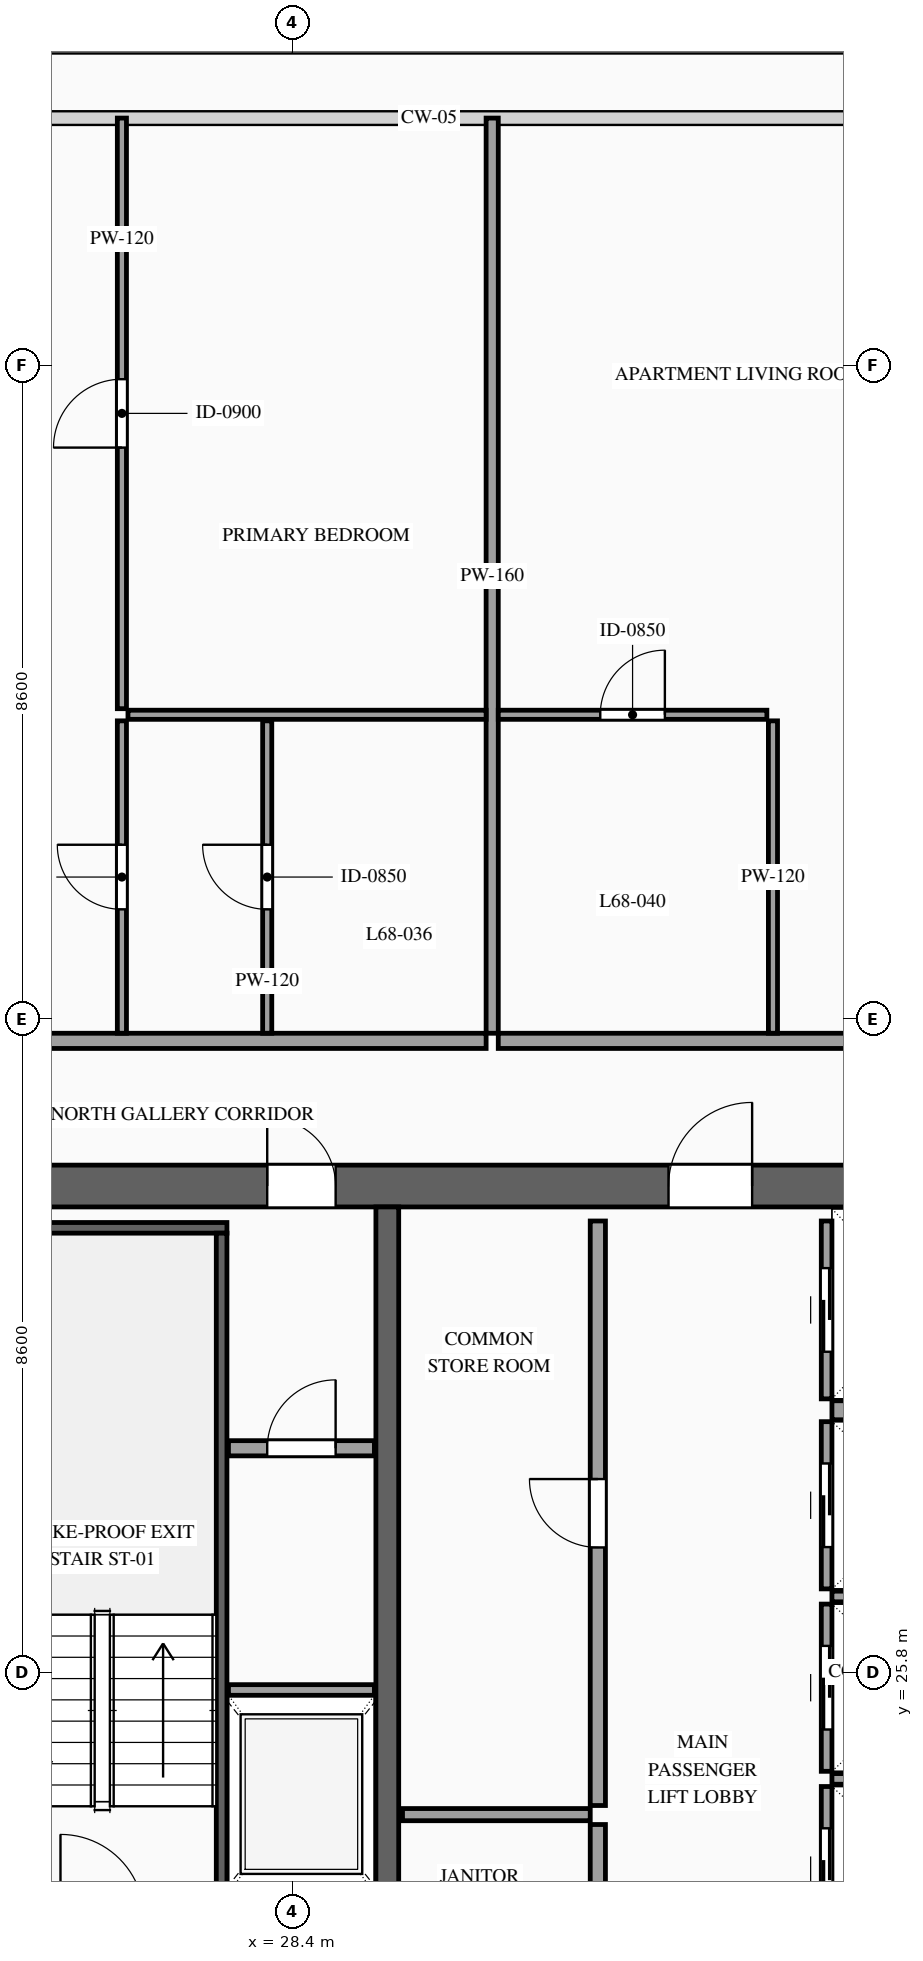
"""IFC4 building model, lengths in metres.
Left out: names, types, materials, properties, quantities, classifications, styles, units other than length and angle.
Written with IfcOpenShell. Run it as: python <this file> out.ifc"""

import sys

from ifc_helpers import new_model, si_unit, direction, frame, frame_2d, origin, place, context, subcontext, project, spatial, rectangle, extrude, source, transform, mapped, element, fill, save


model = new_model("IFC4")
c1 = context("Model", 3, precision=1e-05, world=origin(), true_north=direction((0.0, 1.0)))
c2 = subcontext(c1, "Body", "Model", "MODEL_VIEW")
j1 = project(units=[si_unit("LENGTHUNIT", "METRE"), si_unit("PLANEANGLEUNIT", "RADIAN")], contexts=[c1])
p1 = place(None, origin())
s1 = spatial("IfcSite", under=j1, at=p1, CompositionType="ELEMENT")
p2 = place(p1, origin())
s2 = spatial("IfcBuilding", under=s1, at=p2, CompositionType="ELEMENT")
p3 = place(p2, frame((0.0, 0.0, 255.6)))
s3 = spatial("IfcBuildingStorey", under=s2, at=p3, CompositionType="ELEMENT", Elevation=255.6)
p4 = place(p3, frame((23.525, 32.2, 0.0), z_axis=(0.0, 0.0, 1.0), x_axis=(1.0, 0.0, 0.0)))
e1 = element("IfcWall", 1, at=p4, inside=s3, PredefinedType="SHEAR", context=c2, shape_type="SweptSolid", body=[
    extrude(rectangle(XDim=26.95, YDim=0.55, at=frame_2d((13.475, 0.0))), origin(), (0.0, 0.0, 1.0), 3.5),
])
p5 = place(p4, frame((4.545, 0.0, 0.0)))
e2 = element("IfcOpeningElement", 2, at=p5, cuts=e1, PredefinedType="OPENING", context=c2, shape_type="SweptSolid", body=[
    extrude(rectangle(XDim=0.9, YDim=2.15, at=frame_2d((0.45, 1.075))), frame((0.0, 0.29, 0.0), z_axis=(0.0, -1.0, 0.0), x_axis=(1.0, 0.0, 0.0)), (0.0, 0.0, 1.0), 0.58),
])
p6 = place(p4, frame((9.825, 0.0, 0.0)))
e3 = element("IfcOpeningElement", 3, at=p6, cuts=e1, PredefinedType="OPENING", context=c2, shape_type="SweptSolid", body=[
    extrude(rectangle(XDim=1.1, YDim=2.2, at=frame_2d((0.55, 1.1))), frame((0.0, 0.29, 0.0), z_axis=(0.0, -1.0, 0.0), x_axis=(1.0, 0.0, 0.0)), (0.0, 0.0, 1.0), 0.58),
])
p7 = place(p4, frame((15.675, 0.0, 0.0)))
e4 = element("IfcOpeningElement", 4, at=p7, cuts=e1, PredefinedType="OPENING", context=c2, shape_type="SweptSolid", body=[
    extrude(rectangle(XDim=1.1, YDim=2.2, at=frame_2d((0.55, 1.1))), frame((0.0, 0.29, 0.0), z_axis=(0.0, -1.0, 0.0), x_axis=(1.0, 0.0, 0.0)), (0.0, 0.0, 1.0), 0.58),
])
p8 = place(p4, frame((18.875, 0.0, 0.0)))
e5 = element("IfcOpeningElement", 5, at=p8, cuts=e1, PredefinedType="OPENING", context=c2, shape_type="SweptSolid", body=[
    extrude(rectangle(XDim=0.9, YDim=2.15, at=frame_2d((0.45, 1.075))), frame((0.0, 0.29, 0.0), z_axis=(0.0, -1.0, 0.0), x_axis=(1.0, 0.0, 0.0)), (0.0, 0.0, 1.0), 0.58),
])
m1 = source(origin(), c2, "Body", "SweptSolid", [
    extrude(rectangle(XDim=12.25, YDim=0.3, at=frame_2d((6.125, 0.0))), origin(), (0.0, 0.0, 1.0), 3.5),
])
p9 = place(p3, frame((29.65, 19.675, 0.0), z_axis=(0.0, 0.0, 1.0), x_axis=(0.0, 1.0, 0.0)))
e6 = element("IfcWall", 6, at=p9, inside=s3, PredefinedType="SOLIDWALL", context=c2, shape_type="MappedRepresentation", body=[
    mapped(m1, transform((0.0, 0.0, 0.0), scale=1.0)),
])
m2 = source(origin(), c2, "Body", "SweptSolid", [
    extrude(rectangle(XDim=1.92, YDim=0.14, at=frame_2d((0.96, 0.0))), origin(), (0.0, 0.0, 1.0), 3.2),
])
p10 = place(p3, frame((27.56, 25.57, 0.0), z_axis=(0.0, 0.0, 1.0), x_axis=(1.0, 0.0, 0.0)))
e7 = element("IfcWall", 7, at=p10, inside=s3, PredefinedType="SOLIDWALL", context=c2, shape_type="MappedRepresentation", body=[
    mapped(m2, transform((0.0, 0.0, 0.0), scale=1.0)),
])
p11 = place(p3, frame((35.43, 22.1, 0.0), z_axis=(0.0, 0.0, 1.0), x_axis=(0.0, 1.0, 0.0)))
e8 = element("IfcWall", 8, at=p11, inside=s3, PredefinedType="SOLIDWALL", context=c2, shape_type="SweptSolid", body=[
    extrude(rectangle(XDim=2.2, YDim=0.14, at=frame_2d((1.1, 0.0))), origin(), (0.0, 0.0, 1.0), 3.2),
])
p12 = place(p11, frame((0.55, 0.0, 0.0)))
e9 = element("IfcOpeningElement", 9, at=p12, cuts=e8, PredefinedType="OPENING", context=c2, shape_type="SweptSolid", body=[
    extrude(rectangle(XDim=1.1, YDim=2.2, at=frame_2d((0.55, 1.1))), frame((0.0, 0.085, 0.0), z_axis=(0.0, -1.0, 0.0), x_axis=(1.0, 0.0, 0.0)), (0.0, 0.0, 1.0), 0.17),
])
m3 = source(origin(), c2, "Body", "SweptSolid", [
    extrude(rectangle(XDim=2.4, YDim=0.14, at=frame_2d((1.2, 0.0))), origin(), (0.0, 0.0, 1.0), 3.2),
])
p13 = place(p3, frame((35.5, 24.4, 0.0), z_axis=(0.0, 0.0, 1.0), x_axis=(1.0, 0.0, 0.0)))
e10 = element("IfcWall", 10, at=p13, inside=s3, PredefinedType="SOLIDWALL", context=c2, shape_type="MappedRepresentation", body=[
    mapped(m3, transform((0.0, 0.0, 0.0), scale=1.0)),
])
p14 = place(p3, frame((35.43, 24.5, 0.0), z_axis=(0.0, 0.0, 1.0), x_axis=(0.0, 1.0, 0.0)))
e11 = element("IfcWall", 11, at=p14, inside=s3, PredefinedType="SOLIDWALL", context=c2, shape_type="SweptSolid", body=[
    extrude(rectangle(XDim=2.2, YDim=0.14, at=frame_2d((1.1, 0.0))), origin(), (0.0, 0.0, 1.0), 3.2),
])
p15 = place(p14, frame((0.55, 0.0, 0.0)))
e12 = element("IfcOpeningElement", 12, at=p15, cuts=e11, PredefinedType="OPENING", context=c2, shape_type="SweptSolid", body=[
    extrude(rectangle(XDim=1.1, YDim=2.2, at=frame_2d((0.55, 1.1))), frame((0.0, 0.085, 0.0), z_axis=(0.0, -1.0, 0.0), x_axis=(1.0, 0.0, 0.0)), (0.0, 0.0, 1.0), 0.17),
])
p16 = place(p3, frame((35.5, 26.8, 0.0), z_axis=(0.0, 0.0, 1.0), x_axis=(1.0, 0.0, 0.0)))
e13 = element("IfcWall", 13, at=p16, inside=s3, PredefinedType="SOLIDWALL", context=c2, shape_type="MappedRepresentation", body=[
    mapped(m3, transform((0.0, 0.0, 0.0), scale=1.0)),
])
p17 = place(p3, frame((35.43, 26.9, 0.0), z_axis=(0.0, 0.0, 1.0), x_axis=(0.0, 1.0, 0.0)))
e14 = element("IfcWall", 14, at=p17, inside=s3, PredefinedType="SOLIDWALL", context=c2, shape_type="SweptSolid", body=[
    extrude(rectangle(XDim=2.2, YDim=0.14, at=frame_2d((1.1, 0.0))), origin(), (0.0, 0.0, 1.0), 3.2),
])
p18 = place(p17, frame((0.55, 0.0, 0.0)))
e15 = element("IfcOpeningElement", 15, at=p18, cuts=e14, PredefinedType="OPENING", context=c2, shape_type="SweptSolid", body=[
    extrude(rectangle(XDim=1.1, YDim=2.2, at=frame_2d((0.55, 1.1))), frame((0.0, 0.085, 0.0), z_axis=(0.0, -1.0, 0.0), x_axis=(1.0, 0.0, 0.0)), (0.0, 0.0, 1.0), 0.17),
])
p19 = place(p3, frame((35.43, 29.4, 0.0), z_axis=(0.0, 0.0, 1.0), x_axis=(0.0, 1.0, 0.0)))
e16 = element("IfcWall", 16, at=p19, inside=s3, PredefinedType="SOLIDWALL", context=c2, shape_type="SweptSolid", body=[
    extrude(rectangle(XDim=2.34, YDim=0.14, at=frame_2d((1.17, 0.0))), origin(), (0.0, 0.0, 1.0), 3.2),
])
p20 = place(p19, frame((0.62, 0.0, 0.0)))
e17 = element("IfcOpeningElement", 17, at=p20, cuts=e16, PredefinedType="OPENING", context=c2, shape_type="SweptSolid", body=[
    extrude(rectangle(XDim=1.1, YDim=2.2, at=frame_2d((0.55, 1.1))), frame((0.0, 0.085, 0.0), z_axis=(0.0, -1.0, 0.0), x_axis=(1.0, 0.0, 0.0)), (0.0, 0.0, 1.0), 0.17),
])
m4 = source(origin(), c2, "Body", "SweptSolid", [
    extrude(rectangle(XDim=2.4, YDim=0.25, at=frame_2d((1.2, 0.0))), origin(), (0.0, 0.0, 1.0), 3.2),
])
p21 = place(p3, frame((35.5, 29.25, 0.0), z_axis=(0.0, 0.0, 1.0), x_axis=(1.0, 0.0, 0.0)))
e18 = element("IfcWall", 18, at=p21, inside=s3, PredefinedType="SOLIDWALL", context=c2, shape_type="MappedRepresentation", body=[
    mapped(m4, transform((0.0, 0.0, 0.0), scale=1.0)),
])
m5 = source(origin(), c2, "Body", "SweptSolid", [
    extrude(rectangle(XDim=3.28, YDim=0.14, at=frame_2d((1.64, 0.0))), origin(), (0.0, 0.0, 1.0), 3.2),
])
p22 = place(p3, frame((24.26, 31.65, 0.0), z_axis=(0.0, 0.0, 1.0), x_axis=(1.0, 0.0, 0.0)))
e19 = element("IfcWall", 19, at=p22, inside=s3, PredefinedType="SOLIDWALL", context=c2, shape_type="MappedRepresentation", body=[
    mapped(m5, transform((0.0, 0.0, 0.0), scale=1.0)),
])
m6 = source(origin(), c2, "Body", "SweptSolid", [
    extrude(rectangle(XDim=8.94, YDim=0.14, at=frame_2d((4.47, 0.0))), origin(), (0.0, 0.0, 1.0), 3.2),
])
p23 = place(p3, frame((27.47, 22.64, 0.0), z_axis=(0.0, 0.0, 1.0), x_axis=(0.0, 1.0, 0.0)))
e20 = element("IfcWall", 20, at=p23, inside=s3, PredefinedType="SOLIDWALL", context=c2, shape_type="MappedRepresentation", body=[
    mapped(m6, transform((0.0, 0.0, 0.0), scale=1.0)),
])
p24 = place(p3, frame((27.56, 28.75, 0.0), z_axis=(0.0, 0.0, 1.0), x_axis=(1.0, 0.0, 0.0)))
e21 = element("IfcWall", 21, at=p24, inside=s3, PredefinedType="PARTITIONING", context=c2, shape_type="SweptSolid", body=[
    extrude(rectangle(XDim=1.92, YDim=0.2, at=frame_2d((0.96, 0.0))), origin(), (0.0, 0.0, 1.0), 3.2),
])
p25 = place(p24, frame((0.51, 0.0, 0.0)))
e22 = element("IfcOpeningElement", 22, at=p25, cuts=e21, PredefinedType="OPENING", context=c2, shape_type="SweptSolid", body=[
    extrude(rectangle(XDim=0.9, YDim=2.15, at=frame_2d((0.45, 1.075))), frame((0.0, 0.115, 0.0), z_axis=(0.0, -1.0, 0.0), x_axis=(1.0, 0.0, 0.0)), (0.0, 0.0, 1.0), 0.23),
])
p26 = place(p3, frame((32.42, 19.86, 0.0), z_axis=(0.0, 0.0, 1.0), x_axis=(0.0, 1.0, 0.0)))
e23 = element("IfcWall", 23, at=p26, inside=s3, PredefinedType="PARTITIONING", context=c2, shape_type="SweptSolid", body=[
    extrude(rectangle(XDim=3.94, YDim=0.2, at=frame_2d((1.97, 0.0))), origin(), (0.0, 0.0, 1.0), 3.2),
])
p27 = place(p26, frame((1.52, 0.0, 0.0)))
e24 = element("IfcOpeningElement", 24, at=p27, cuts=e23, PredefinedType="OPENING", context=c2, shape_type="SweptSolid", body=[
    extrude(rectangle(XDim=0.9, YDim=2.15, at=frame_2d((0.45, 1.075))), frame((0.0, 0.115, 0.0), z_axis=(0.0, -1.0, 0.0), x_axis=(1.0, 0.0, 0.0)), (0.0, 0.0, 1.0), 0.23),
])
p28 = place(p3, frame((32.42, 24.05, 0.0), z_axis=(0.0, 0.0, 1.0), x_axis=(0.0, 1.0, 0.0)))
e25 = element("IfcWall", 25, at=p28, inside=s3, PredefinedType="PARTITIONING", context=c2, shape_type="SweptSolid", body=[
    extrude(rectangle(XDim=7.69, YDim=0.2, at=frame_2d((3.845, 0.0))), origin(), (0.0, 0.0, 1.0), 3.2),
])
p29 = place(p28, frame((3.395, 0.0, 0.0)))
e26 = element("IfcOpeningElement", 26, at=p29, cuts=e25, PredefinedType="OPENING", context=c2, shape_type="SweptSolid", body=[
    extrude(rectangle(XDim=0.9, YDim=2.15, at=frame_2d((0.45, 1.075))), frame((0.0, 0.115, 0.0), z_axis=(0.0, -1.0, 0.0), x_axis=(1.0, 0.0, 0.0)), (0.0, 0.0, 1.0), 0.23),
])
m7 = source(origin(), c2, "Body", "SweptSolid", [
    extrude(rectangle(XDim=2.47, YDim=0.16, at=frame_2d((1.235, 0.0))), origin(), (0.0, 0.0, 1.0), 3.2),
])
p30 = place(p3, frame((29.85, 23.93, 0.0), z_axis=(0.0, 0.0, 1.0), x_axis=(1.0, 0.0, 0.0)))
e27 = element("IfcWall", 27, at=p30, inside=s3, PredefinedType="PARTITIONING", context=c2, shape_type="MappedRepresentation", body=[
    mapped(m7, transform((0.0, 0.0, 0.0), scale=1.0)),
])
p31 = place(p3, frame((19.44, 34.11, 0.0), z_axis=(0.0, 0.0, 1.0), x_axis=(1.0, 0.0, 0.0)))
e28 = element("IfcWall", 28, at=p31, inside=s3, PredefinedType="PARTITIONING", context=c2, shape_type="SweptSolid", body=[
    extrude(rectangle(XDim=11.51, YDim=0.2, at=frame_2d((5.755, 0.0))), origin(), (0.0, 0.0, 1.0), 3.2),
])
p32 = place(p31, frame((4.626, 0.0, 0.0)))
e29 = element("IfcOpeningElement", 29, at=p32, cuts=e28, PredefinedType="OPENING", context=c2, shape_type="SweptSolid", body=[
    extrude(rectangle(XDim=1.0, YDim=2.2, at=frame_2d((0.5, 1.1))), frame((0.0, 0.115, 0.0), z_axis=(0.0, -1.0, 0.0), x_axis=(1.0, 0.0, 0.0)), (0.0, 0.0, 1.0), 0.23),
])
m8 = source(origin(), c2, "Body", "SweptSolid", [
    extrude(rectangle(XDim=12.04, YDim=0.16, at=frame_2d((6.02, 0.0))), origin(), (0.0, 0.0, 1.0), 3.2),
])
p33 = place(p3, frame((31.03, 34.21, 0.0), z_axis=(0.0, 0.0, 1.0), x_axis=(0.0, 1.0, 0.0)))
e30 = element("IfcWall", 30, at=p33, inside=s3, PredefinedType="PARTITIONING", context=c2, shape_type="MappedRepresentation", body=[
    mapped(m8, transform((0.0, 0.0, 0.0), scale=1.0)),
])
p34 = place(p3, frame((28.07, 34.21, 0.0), z_axis=(0.0, 0.0, 1.0), x_axis=(0.0, 1.0, 0.0)))
e31 = element("IfcWall", 31, at=p34, inside=s3, PredefinedType="PARTITIONING", context=c2, shape_type="SweptSolid", body=[
    extrude(rectangle(XDim=4.11, YDim=0.12, at=frame_2d((2.055, 0.0))), origin(), (0.0, 0.0, 1.0), 3.2),
])
p35 = place(p34, frame((1.63, 0.0, 0.0)))
e32 = element("IfcOpeningElement", 32, at=p35, cuts=e31, PredefinedType="OPENING", context=c2, shape_type="SweptSolid", body=[
    extrude(rectangle(XDim=0.85, YDim=2.1, at=frame_2d((0.425, 1.05))), frame((0.0, 0.075, 0.0), z_axis=(0.0, -1.0, 0.0), x_axis=(1.0, 0.0, 0.0)), (0.0, 0.0, 1.0), 0.15),
])
m9 = source(origin(), c2, "Body", "SweptSolid", [
    extrude(rectangle(XDim=4.712, YDim=0.12, at=frame_2d((2.356, 0.0))), origin(), (0.0, 0.0, 1.0), 3.2),
])
p36 = place(p3, frame((26.238, 38.4, 0.0), z_axis=(0.0, 0.0, 1.0), x_axis=(1.0, 0.0, 0.0)))
e33 = element("IfcWall", 33, at=p36, inside=s3, PredefinedType="PARTITIONING", context=c2, shape_type="MappedRepresentation", body=[
    mapped(m9, transform((0.0, 0.0, 0.0), scale=1.0)),
])
p37 = place(p3, frame((26.158, 38.48, 0.0), z_axis=(0.0, 0.0, 1.0), x_axis=(0.0, 1.0, 0.0)))
e34 = element("IfcWall", 34, at=p37, inside=s3, PredefinedType="PARTITIONING", context=c2, shape_type="SweptSolid", body=[
    extrude(rectangle(XDim=7.77, YDim=0.12, at=frame_2d((3.885, 0.0))), origin(), (0.0, 0.0, 1.0), 3.2),
])
p38 = place(p37, frame((3.435, 0.0, 0.0)))
e35 = element("IfcOpeningElement", 35, at=p38, cuts=e34, PredefinedType="OPENING", context=c2, shape_type="SweptSolid", body=[
    extrude(rectangle(XDim=0.9, YDim=2.15, at=frame_2d((0.45, 1.075))), frame((0.0, 0.075, 0.0), z_axis=(0.0, -1.0, 0.0), x_axis=(1.0, 0.0, 0.0)), (0.0, 0.0, 1.0), 0.15),
])
p39 = place(p3, frame((26.158, 34.21, 0.0), z_axis=(0.0, 0.0, 1.0), x_axis=(0.0, 1.0, 0.0)))
e36 = element("IfcWall", 36, at=p39, inside=s3, PredefinedType="PARTITIONING", context=c2, shape_type="SweptSolid", body=[
    extrude(rectangle(XDim=4.11, YDim=0.12, at=frame_2d((2.055, 0.0))), origin(), (0.0, 0.0, 1.0), 3.2),
])
p40 = place(p39, frame((1.63, 0.0, 0.0)))
e37 = element("IfcOpeningElement", 37, at=p40, cuts=e36, PredefinedType="OPENING", context=c2, shape_type="SweptSolid", body=[
    extrude(rectangle(XDim=0.85, YDim=2.1, at=frame_2d((0.425, 1.05))), frame((0.0, 0.075, 0.0), z_axis=(0.0, -1.0, 0.0), x_axis=(1.0, 0.0, 0.0)), (0.0, 0.0, 1.0), 0.15),
])
p41 = place(p3, frame((31.11, 34.11, 0.0), z_axis=(0.0, 0.0, 1.0), x_axis=(1.0, 0.0, 0.0)))
e38 = element("IfcWall", 38, at=p41, inside=s3, PredefinedType="PARTITIONING", context=c2, shape_type="SweptSolid", body=[
    extrude(rectangle(XDim=11.78, YDim=0.2, at=frame_2d((5.89, 0.0))), origin(), (0.0, 0.0, 1.0), 3.2),
])
p42 = place(p41, frame((4.801, 0.0, 0.0)))
e39 = element("IfcOpeningElement", 39, at=p42, cuts=e38, PredefinedType="OPENING", context=c2, shape_type="SweptSolid", body=[
    extrude(rectangle(XDim=1.0, YDim=2.2, at=frame_2d((0.5, 1.1))), frame((0.0, 0.115, 0.0), z_axis=(0.0, -1.0, 0.0), x_axis=(1.0, 0.0, 0.0)), (0.0, 0.0, 1.0), 0.23),
])
p43 = place(p3, frame((31.11, 38.4, 0.0), z_axis=(0.0, 0.0, 1.0), x_axis=(1.0, 0.0, 0.0)))
e40 = element("IfcWall", 40, at=p43, inside=s3, PredefinedType="PARTITIONING", context=c2, shape_type="SweptSolid", body=[
    extrude(rectangle(XDim=3.534, YDim=0.12, at=frame_2d((1.767, 0.0))), origin(), (0.0, 0.0, 1.0), 3.2),
])
p44 = place(p43, frame((1.342, 0.0, 0.0)))
e41 = element("IfcOpeningElement", 41, at=p44, cuts=e40, PredefinedType="OPENING", context=c2, shape_type="SweptSolid", body=[
    extrude(rectangle(XDim=0.85, YDim=2.1, at=frame_2d((0.425, 1.05))), frame((0.0, 0.075, 0.0), z_axis=(0.0, -1.0, 0.0), x_axis=(1.0, 0.0, 0.0)), (0.0, 0.0, 1.0), 0.15),
])
m10 = source(origin(), c2, "Body", "SweptSolid", [
    extrude(rectangle(XDim=4.11, YDim=0.12, at=frame_2d((2.055, 0.0))), origin(), (0.0, 0.0, 1.0), 3.2),
])
p45 = place(p3, frame((34.724, 34.21, 0.0), z_axis=(0.0, 0.0, 1.0), x_axis=(0.0, 1.0, 0.0)))
e42 = element("IfcWall", 42, at=p45, inside=s3, PredefinedType="PARTITIONING", context=c2, shape_type="MappedRepresentation", body=[
    mapped(m10, transform((0.0, 0.0, 0.0), scale=1.0)),
])
m11 = source(origin(), c2, "Body", "SweptSolid", [
    extrude(rectangle(XDim=1.1, YDim=2.2, at=frame_2d((0.55, 1.1))), frame((0.0, 0.025, 0.0), z_axis=(0.0, -1.0, 0.0), x_axis=(1.0, 0.0, 0.0)), (0.0, 0.0, 1.0), 0.05),
])
p46 = place(p12, origin())
e43 = element("IfcDoor", 43, at=p46, inside=s3, OperationType="SLIDING_TO_LEFT", PredefinedType="DOOR", context=c2, shape_type="MappedRepresentation", body=[
    mapped(m11, transform((0.0, 0.0, 0.0), scale=1.0)),
])
fill(e9, e43)
p47 = place(p15, origin())
e44 = element("IfcDoor", 44, at=p47, inside=s3, OperationType="SLIDING_TO_RIGHT", PredefinedType="DOOR", context=c2, shape_type="MappedRepresentation", body=[
    mapped(m11, transform((0.0, 0.0, 0.0), scale=1.0)),
])
fill(e12, e44)
p48 = place(p18, origin())
e45 = element("IfcDoor", 45, at=p48, inside=s3, OperationType="SLIDING_TO_LEFT", PredefinedType="DOOR", context=c2, shape_type="MappedRepresentation", body=[
    mapped(m11, transform((0.0, 0.0, 0.0), scale=1.0)),
])
fill(e15, e45)
p49 = place(p20, origin())
e46 = element("IfcDoor", 46, at=p49, inside=s3, OperationType="SLIDING_TO_RIGHT", PredefinedType="DOOR", context=c2, shape_type="MappedRepresentation", body=[
    mapped(m11, transform((0.0, 0.0, 0.0), scale=1.0)),
])
fill(e17, e46)
m12 = source(origin(), c2, "Body", "SweptSolid", [
    extrude(rectangle(XDim=0.9, YDim=2.15, at=frame_2d((0.45, 1.075))), frame((0.0, 0.025, 0.0), z_axis=(0.0, -1.0, 0.0), x_axis=(1.0, 0.0, 0.0)), (0.0, 0.0, 1.0), 0.05),
])
p50 = place(p5, origin())
e47 = element("IfcDoor", 47, at=p50, inside=s3, OperationType="SINGLE_SWING_LEFT", PredefinedType="DOOR", context=c2, shape_type="MappedRepresentation", body=[
    mapped(m12, transform((0.0, 0.0, 0.0), scale=1.0)),
])
fill(e2, e47)
m13 = source(origin(), c2, "Body", "SweptSolid", [
    extrude(rectangle(XDim=1.1, YDim=2.2, at=frame_2d((0.55, 1.1))), frame((0.0, 0.025, 0.0), z_axis=(0.0, -1.0, 0.0), x_axis=(1.0, 0.0, 0.0)), (0.0, 0.0, 1.0), 0.05),
])
p51 = place(p6, origin())
e48 = element("IfcDoor", 48, at=p51, inside=s3, OperationType="SINGLE_SWING_RIGHT", PredefinedType="DOOR", context=c2, shape_type="MappedRepresentation", body=[
    mapped(m13, transform((0.0, 0.0, 0.0), scale=1.0)),
])
fill(e3, e48)
p52 = place(p25, origin())
e49 = element("IfcDoor", 49, at=p52, inside=s3, OperationType="SINGLE_SWING_RIGHT", PredefinedType="DOOR", context=c2, shape_type="MappedRepresentation", body=[
    mapped(m12, transform((0.0, 0.0, 0.0), scale=1.0)),
])
fill(e22, e49)
p53 = place(p29, origin())
e50 = element("IfcDoor", 50, at=p53, inside=s3, OperationType="SINGLE_SWING_RIGHT", PredefinedType="DOOR", context=c2, shape_type="MappedRepresentation", body=[
    mapped(m12, transform((0.0, 0.0, 0.0), scale=1.0)),
])
fill(e26, e50)
m14 = source(origin(), c2, "Body", "SweptSolid", [
    extrude(rectangle(XDim=0.85, YDim=2.1, at=frame_2d((0.425, 1.05))), frame((0.0, 0.025, 0.0), z_axis=(0.0, -1.0, 0.0), x_axis=(1.0, 0.0, 0.0)), (0.0, 0.0, 1.0), 0.05),
])
p54 = place(p35, origin())
e51 = element("IfcDoor", 51, at=p54, inside=s3, OperationType="SINGLE_SWING_RIGHT", PredefinedType="DOOR", context=c2, shape_type="MappedRepresentation", body=[
    mapped(m14, transform((0.0, 0.0, 0.0), scale=1.0)),
])
fill(e32, e51)
m15 = source(origin(), c2, "Body", "SweptSolid", [
    extrude(rectangle(XDim=0.9, YDim=2.15, at=frame_2d((0.45, 1.075))), frame((0.0, 0.025, 0.0), z_axis=(0.0, -1.0, 0.0), x_axis=(1.0, 0.0, 0.0)), (0.0, 0.0, 1.0), 0.05),
])
p55 = place(p38, origin())
e52 = element("IfcDoor", 52, at=p55, inside=s3, OperationType="SINGLE_SWING_LEFT", PredefinedType="DOOR", context=c2, shape_type="MappedRepresentation", body=[
    mapped(m15, transform((0.0, 0.0, 0.0), scale=1.0)),
])
fill(e35, e52)
p56 = place(p40, origin())
e53 = element("IfcDoor", 53, at=p56, inside=s3, OperationType="SINGLE_SWING_RIGHT", PredefinedType="DOOR", context=c2, shape_type="MappedRepresentation", body=[
    mapped(m14, transform((0.0, 0.0, 0.0), scale=1.0)),
])
fill(e37, e53)
p57 = place(p44, origin())
e54 = element("IfcDoor", 54, at=p57, inside=s3, OperationType="SINGLE_SWING_RIGHT", PredefinedType="DOOR", context=c2, shape_type="MappedRepresentation", body=[
    mapped(m14, transform((0.0, 0.0, 0.0), scale=1.0)),
])
fill(e41, e54)
save(model, sys.argv[1])
